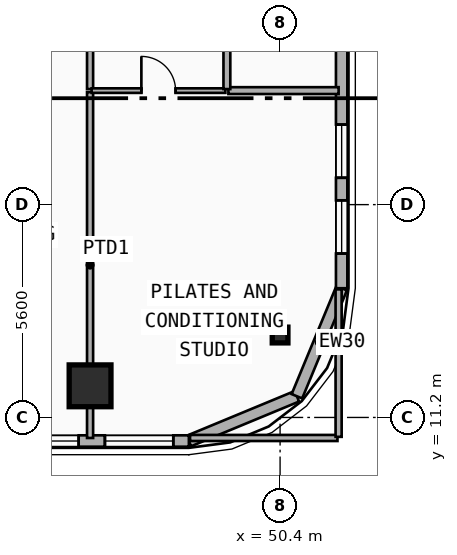
"""IFC4 building model, lengths in metres.
Left out: names, types, materials, properties, quantities, classifications, styles, units other than length and angle.
Written with IfcOpenShell. Run it as: python <this file> out.ifc"""

import sys

from ifc_helpers import new_model, si_unit, direction, frame, frame_2d, origin, origin_2d, place, context, subcontext, project, spatial, rectangle, i_section, extrude, element, fill, save


model = new_model("IFC4")
c1 = context("Model", 3, precision=1e-05, world=origin(), true_north=direction((0.0, 1.0)))
c2 = subcontext(c1, "Body", "Model", "MODEL_VIEW")
j1 = project(units=[si_unit("LENGTHUNIT", "METRE"), si_unit("PLANEANGLEUNIT", "RADIAN")], contexts=[c1])
p1 = place(None, origin())
s1 = spatial("IfcSite", under=j1, at=p1, CompositionType="ELEMENT")
p2 = place(p1, origin())
s2 = spatial("IfcBuilding", under=s1, at=p2, CompositionType="ELEMENT")
p3 = place(p2, frame((0.0, 0.0, 155.45)))
s3 = spatial("IfcBuildingStorey", under=s2, at=p3, CompositionType="ELEMENT", Elevation=155.45)
p4 = place(p3, frame((45.4, 12.141, 0.0), z_axis=(0.0, -0.0902702026, 0.995917311087), x_axis=(1.0, 0.0, 0.0)))
e1 = element("IfcColumn", 1, at=p4, inside=s3, PredefinedType="COLUMN", context=c2, shape_type="SweptSolid", body=[
    extrude(rectangle(XDim=1.1, YDim=1.1, at=origin_2d()), origin(), (0.0, 0.0, 1.0), 3.565),
])
p5 = place(p3, frame((50.4, 13.465, 0.0), z_axis=(0.0, -0.079862380324, 0.996805898964), x_axis=(1.0, 0.0, 0.0)))
e2 = element("IfcColumn", 2, at=p5, inside=s3, PredefinedType="COLUMN", context=c2, shape_type="SweptSolid", body=[
    extrude(i_section(OverallWidth=0.413, OverallDepth=0.415, WebThickness=0.03, FlangeThickness=0.047, FilletRadius=0.015, at=origin_2d()), origin(), (0.0, 0.0, 1.0), 3.562),
])
p6 = place(p3, frame((50.843, 11.757, 0.0), z_axis=(0.0, 0.0, 1.0), x_axis=(-0.92389884758, -0.382636798336, 0.0)))
e3 = element("IfcWall", 3, at=p6, inside=s3, PredefinedType="SOLIDWALL", context=c2, shape_type="SweptSolid", body=[
    extrude(rectangle(XDim=3.077, YDim=0.3, at=frame_2d((1.538, 0.0))), origin(), (0.0, 0.0, 1.0), 3.29),
])
p7 = place(p3, frame((52.02, 14.6, 0.0), z_axis=(0.0, 0.0, 1.0), x_axis=(-0.382676475685, -0.923882414032, 0.0)))
e4 = element("IfcWall", 4, at=p7, inside=s3, PredefinedType="SOLIDWALL", context=c2, shape_type="SweptSolid", body=[
    extrude(rectangle(XDim=3.077, YDim=0.3, at=frame_2d((1.539, 0.0))), origin(), (0.0, 0.0, 1.0), 3.29),
])
p8 = place(p3, frame((52.02, 37.6, 0.0), z_axis=(0.0, 0.0, 1.0), x_axis=(0.0, -1.0, 0.0)))
e5 = element("IfcWall", 5, at=p8, inside=s3, PredefinedType="SOLIDWALL", context=c2, shape_type="SweptSolid", body=[
    extrude(rectangle(XDim=23.0, YDim=0.3, at=frame_2d((11.5, 0.0))), origin(), (0.0, 0.0, 1.0), 3.29),
])
p9 = place(p8, frame((2.513, 0.0, 0.34)))
e6 = element("IfcOpeningElement", 6, at=p9, cuts=e5, PredefinedType="OPENING", context=c2, shape_type="SweptSolid", body=[
    extrude(rectangle(XDim=1.4, YDim=2.1, at=frame_2d((0.7, 1.05))), frame((0.0, 0.16, 0.0), z_axis=(0.0, -1.0, 0.0), x_axis=(1.0, 0.0, 0.0)), (0.0, 0.0, 1.0), 0.32),
])
p10 = place(p8, frame((6.107, 0.0, 0.34)))
e7 = element("IfcOpeningElement", 7, at=p10, cuts=e5, PredefinedType="OPENING", context=c2, shape_type="SweptSolid", body=[
    extrude(rectangle(XDim=1.4, YDim=2.1, at=frame_2d((0.7, 1.05))), frame((0.0, 0.16, 0.0), z_axis=(0.0, -1.0, 0.0), x_axis=(1.0, 0.0, 0.0)), (0.0, 0.0, 1.0), 0.32),
])
p11 = place(p8, frame((18.693, 0.0, 0.34)))
e8 = element("IfcOpeningElement", 8, at=p11, cuts=e5, PredefinedType="OPENING", context=c2, shape_type="SweptSolid", body=[
    extrude(rectangle(XDim=1.4, YDim=2.1, at=frame_2d((0.7, 1.05))), frame((0.0, 0.16, 0.0), z_axis=(0.0, -1.0, 0.0), x_axis=(1.0, 0.0, 0.0)), (0.0, 0.0, 1.0), 0.32),
])
p12 = place(p8, frame((20.687, 0.0, 0.34)))
e9 = element("IfcOpeningElement", 9, at=p12, cuts=e5, PredefinedType="OPENING", context=c2, shape_type="SweptSolid", body=[
    extrude(rectangle(XDim=1.4, YDim=2.1, at=frame_2d((0.7, 1.05))), frame((0.0, 0.16, 0.0), z_axis=(0.0, -1.0, 0.0), x_axis=(1.0, 0.0, 0.0)), (0.0, 0.0, 1.0), 0.32),
])
p13 = place(p3, frame((48.0, 10.58, 0.0), z_axis=(0.0, 0.0, 1.0), x_axis=(-1.0, 0.0, 0.0)))
e10 = element("IfcWall", 10, at=p13, inside=s3, PredefinedType="SOLIDWALL", context=c2, shape_type="SweptSolid", body=[
    extrude(rectangle(XDim=38.4, YDim=0.3, at=frame_2d((19.2, 0.0))), origin(), (0.0, 0.0, 1.0), 3.29),
])
p14 = place(p13, frame((36.19, 0.0, 0.34)))
e11 = element("IfcOpeningElement", 11, at=p14, cuts=e10, PredefinedType="OPENING", context=c2, shape_type="SweptSolid", body=[
    extrude(rectangle(XDim=1.8, YDim=1.8, at=frame_2d((0.9, 0.9))), frame((0.0, 0.16, 0.0), z_axis=(0.0, -1.0, 0.0), x_axis=(1.0, 0.0, 0.0)), (0.0, 0.0, 1.0), 0.32),
])
p15 = place(p13, frame((33.67, 0.0, 1.22)))
e12 = element("IfcOpeningElement", 12, at=p15, cuts=e10, PredefinedType="OPENING", context=c2, shape_type="SweptSolid", body=[
    extrude(rectangle(XDim=1.2, YDim=1.5, at=frame_2d((0.6, 0.75))), frame((0.0, 0.16, 0.0), z_axis=(0.0, -1.0, 0.0), x_axis=(1.0, 0.0, 0.0)), (0.0, 0.0, 1.0), 0.32),
])
p16 = place(p13, frame((26.95, 0.0, 0.34)))
e13 = element("IfcOpeningElement", 13, at=p16, cuts=e10, PredefinedType="OPENING", context=c2, shape_type="SweptSolid", body=[
    extrude(rectangle(XDim=1.8, YDim=1.8, at=frame_2d((0.9, 0.9))), frame((0.0, 0.16, 0.0), z_axis=(0.0, -1.0, 0.0), x_axis=(1.0, 0.0, 0.0)), (0.0, 0.0, 1.0), 0.32),
])
p17 = place(p13, frame((21.15, 0.0, 0.65)))
e14 = element("IfcOpeningElement", 14, at=p17, cuts=e10, PredefinedType="OPENING", context=c2, shape_type="SweptSolid", body=[
    extrude(rectangle(XDim=2.1, YDim=2.1, at=frame_2d((1.05, 1.05))), frame((0.0, 0.16, 0.0), z_axis=(0.0, -1.0, 0.0), x_axis=(1.0, 0.0, 0.0)), (0.0, 0.0, 1.0), 0.32),
])
p18 = place(p13, frame((14.375, 0.0, 0.65)))
e15 = element("IfcOpeningElement", 15, at=p18, cuts=e10, PredefinedType="OPENING", context=c2, shape_type="SweptSolid", body=[
    extrude(rectangle(XDim=2.1, YDim=2.1, at=frame_2d((1.05, 1.05))), frame((0.0, 0.16, 0.0), z_axis=(0.0, -1.0, 0.0), x_axis=(1.0, 0.0, 0.0)), (0.0, 0.0, 1.0), 0.32),
])
p19 = place(p13, frame((2.9, 0.0, 0.34)))
e16 = element("IfcOpeningElement", 16, at=p19, cuts=e10, PredefinedType="OPENING", context=c2, shape_type="SweptSolid", body=[
    extrude(rectangle(XDim=1.8, YDim=1.8, at=frame_2d((0.9, 0.9))), frame((0.0, 0.16, 0.0), z_axis=(0.0, -1.0, 0.0), x_axis=(1.0, 0.0, 0.0)), (0.0, 0.0, 1.0), 0.32),
])
p20 = place(p13, frame((0.41, 0.0, 0.34)))
e17 = element("IfcOpeningElement", 17, at=p20, cuts=e10, PredefinedType="OPENING", context=c2, shape_type="SweptSolid", body=[
    extrude(rectangle(XDim=1.8, YDim=1.8, at=frame_2d((0.9, 0.9))), frame((0.0, 0.16, 0.0), z_axis=(0.0, -1.0, 0.0), x_axis=(1.0, 0.0, 0.0)), (0.0, 0.0, 1.0), 0.32),
])
p21 = place(p3, frame((45.4, 10.66, 0.0), z_axis=(0.0, 0.0, 1.0), x_axis=(0.0, 1.0, 0.0)))
e18 = element("IfcWall", 18, at=p21, inside=s3, PredefinedType="PARTITIONING", context=c2, shape_type="SweptSolid", body=[
    extrude(rectangle(XDim=9.1, YDim=0.16, at=frame_2d((4.55, 0.0))), origin(), (0.0, 0.0, 1.0), 2.36),
])
p22 = place(p3, frame((45.4, 19.84, 0.0), z_axis=(0.0, 0.0, 1.0), x_axis=(0.0, 1.0, 0.0)))
e19 = element("IfcWall", 19, at=p22, inside=s3, PredefinedType="PARTITIONING", context=c2, shape_type="SweptSolid", body=[
    extrude(rectangle(XDim=5.67, YDim=0.16, at=frame_2d((2.835, 0.0))), origin(), (0.0, 0.0, 1.0), 2.36),
])
p23 = place(p3, frame((45.44, 19.8, 0.0), z_axis=(0.0, 0.0, 1.0), x_axis=(1.0, 0.0, 0.0)))
e20 = element("IfcWall", 20, at=p23, inside=s3, PredefinedType="PARTITIONING", context=c2, shape_type="SweptSolid", body=[
    extrude(rectangle(XDim=3.52, YDim=0.12, at=frame_2d((1.76, 0.0))), origin(), (0.0, 0.0, 1.0), 2.36),
])
p24 = place(p23, frame((1.31, 0.0, 0.0)))
e21 = element("IfcOpeningElement", 21, at=p24, cuts=e20, PredefinedType="OPENING", context=c2, shape_type="SweptSolid", body=[
    extrude(rectangle(XDim=0.9, YDim=2.1, at=frame_2d((0.45, 1.05))), frame((0.0, 0.07, 0.0), z_axis=(0.0, -1.0, 0.0), x_axis=(1.0, 0.0, 0.0)), (0.0, 0.0, 1.0), 0.14),
])
p25 = place(p3, frame((49.04, 19.8, 0.0), z_axis=(0.0, 0.0, 1.0), x_axis=(1.0, 0.0, 0.0)))
e22 = element("IfcWall", 22, at=p25, inside=s3, PredefinedType="PLUMBINGWALL", context=c2, shape_type="SweptSolid", body=[
    extrude(rectangle(XDim=2.9, YDim=0.18, at=frame_2d((1.45, 0.0))), origin(), (0.0, 0.0, 1.0), 2.62),
])
p26 = place(p3, frame((49.0, 19.84, 0.0), z_axis=(0.0, 0.0, 1.0), x_axis=(0.0, 1.0, 0.0)))
e23 = element("IfcWall", 23, at=p26, inside=s3, PredefinedType="PLUMBINGWALL", context=c2, shape_type="SweptSolid", body=[
    extrude(rectangle(XDim=5.67, YDim=0.18, at=frame_2d((2.835, 0.0))), origin(), (0.0, 0.0, 1.0), 2.77),
])
p27 = place(p3, frame((48.03, 10.66, 0.0), z_axis=(0.0, 0.0, 1.0), x_axis=(1.0, 0.0, 0.0)))
e24 = element("IfcWall", 24, at=p27, inside=s3, PredefinedType="PARTITIONING", context=c2, shape_type="SweptSolid", body=[
    extrude(rectangle(XDim=3.88, YDim=0.16, at=frame_2d((1.94, 0.0))), origin(), (0.0, 0.0, 1.0), 3.29),
])
p28 = place(p3, frame((51.94, 10.69, 0.0), z_axis=(0.0, 0.0, 1.0), x_axis=(0.0, 1.0, 0.0)))
e25 = element("IfcWall", 25, at=p28, inside=s3, PredefinedType="PARTITIONING", context=c2, shape_type="SweptSolid", body=[
    extrude(rectangle(XDim=3.88, YDim=0.16, at=frame_2d((1.94, 0.0))), origin(), (0.0, 0.0, 1.0), 3.29),
])
p29 = place(p11, origin())
e26 = element("IfcWindow", 26, at=p29, inside=s3, PartitioningType="SINGLE_PANEL", PredefinedType="WINDOW", context=c2, shape_type="SweptSolid", body=[
    extrude(rectangle(XDim=1.4, YDim=2.1, at=frame_2d((0.7, 1.05))), frame((0.0, 0.03, 0.0), z_axis=(0.0, -1.0, 0.0), x_axis=(1.0, 0.0, 0.0)), (0.0, 0.0, 1.0), 0.06),
])
fill(e8, e26)
p30 = place(p12, origin())
e27 = element("IfcWindow", 27, at=p30, inside=s3, PartitioningType="SINGLE_PANEL", PredefinedType="WINDOW", context=c2, shape_type="SweptSolid", body=[
    extrude(rectangle(XDim=1.4, YDim=2.1, at=frame_2d((0.7, 1.05))), frame((0.0, 0.03, 0.0), z_axis=(0.0, -1.0, 0.0), x_axis=(1.0, 0.0, 0.0)), (0.0, 0.0, 1.0), 0.06),
])
fill(e9, e27)
p31 = place(p19, origin())
e28 = element("IfcWindow", 28, at=p31, inside=s3, PartitioningType="SINGLE_PANEL", PredefinedType="WINDOW", context=c2, shape_type="SweptSolid", body=[
    extrude(rectangle(XDim=1.8, YDim=1.8, at=frame_2d((0.9, 0.9))), frame((0.0, 0.03, 0.0), z_axis=(0.0, -1.0, 0.0), x_axis=(1.0, 0.0, 0.0)), (0.0, 0.0, 1.0), 0.06),
])
fill(e16, e28)
p32 = place(p20, origin())
e29 = element("IfcWindow", 29, at=p32, inside=s3, PartitioningType="SINGLE_PANEL", PredefinedType="WINDOW", context=c2, shape_type="SweptSolid", body=[
    extrude(rectangle(XDim=1.8, YDim=1.8, at=frame_2d((0.9, 0.9))), frame((0.0, 0.03, 0.0), z_axis=(0.0, -1.0, 0.0), x_axis=(1.0, 0.0, 0.0)), (0.0, 0.0, 1.0), 0.06),
])
fill(e17, e29)
p33 = place(p24, origin())
e30 = element("IfcDoor", 30, at=p33, inside=s3, OperationType="SINGLE_SWING_LEFT", PredefinedType="DOOR", context=c2, shape_type="SweptSolid", body=[
    extrude(rectangle(XDim=0.9, YDim=2.1, at=frame_2d((0.45, 1.05))), frame((0.0, 0.025, 0.0), z_axis=(0.0, -1.0, 0.0), x_axis=(1.0, 0.0, 0.0)), (0.0, 0.0, 1.0), 0.05),
])
fill(e21, e30)
save(model, sys.argv[1])
